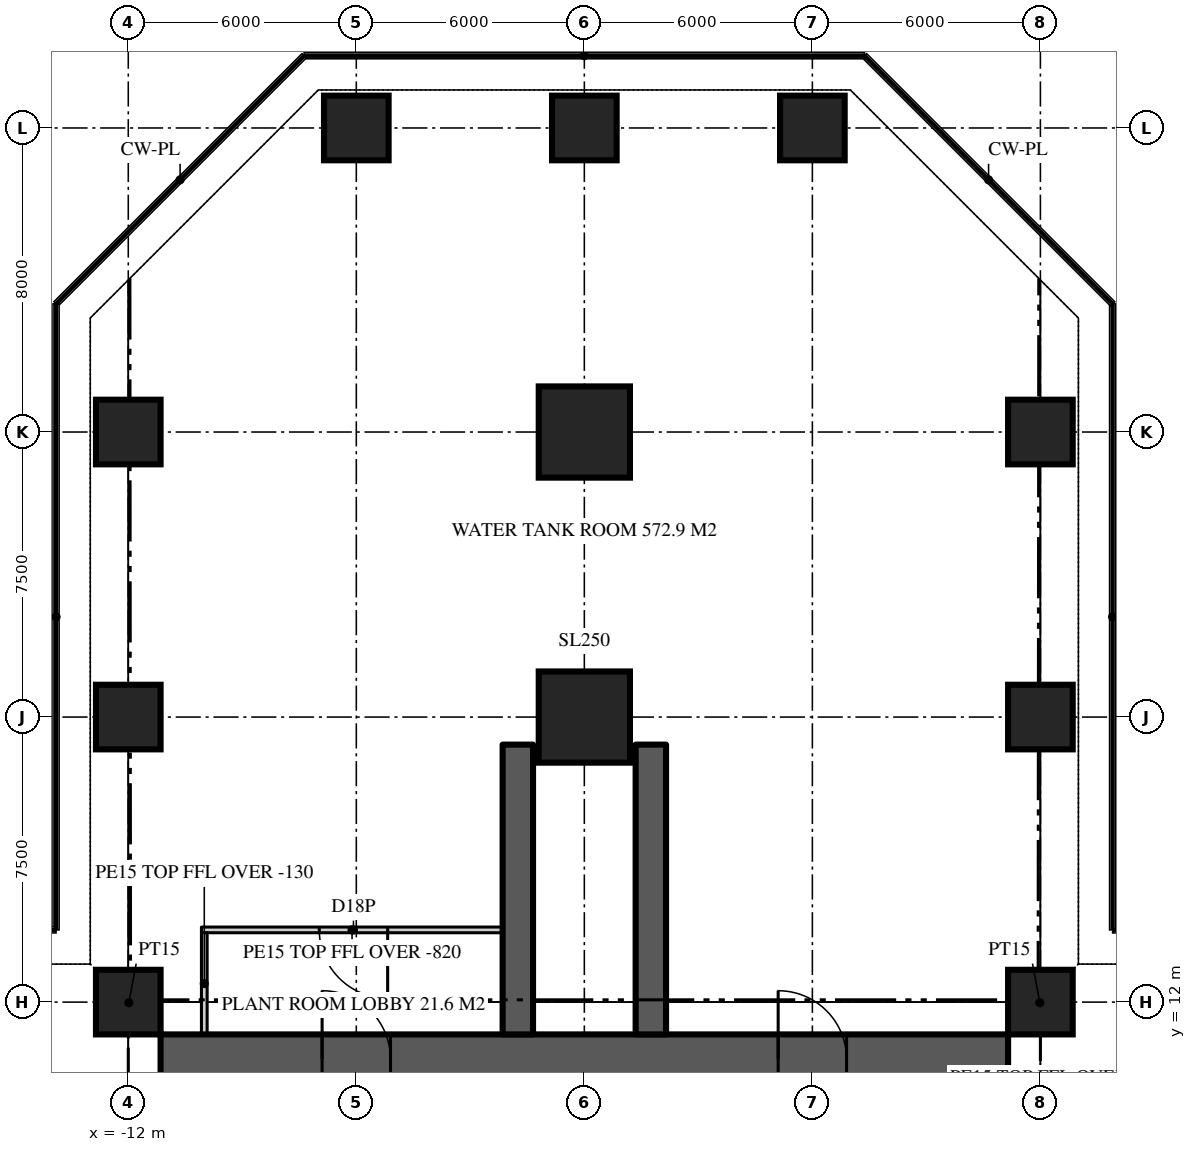
"""IFC4 building model, lengths in metres.
Left out: names, types, materials, properties, quantities, classifications, styles, units other than length and angle.
Written with IfcOpenShell. Run it as: python <this file> out.ifc"""

import sys

from ifc_helpers import new_model, si_unit, direction, frame, frame_2d, origin, origin_2d, place, context, subcontext, project, spatial, rectangle, extrude, element, fill, save


model = new_model("IFC4")
c1 = context("Model", 3, precision=1e-05, world=origin(), true_north=direction((0.0, 1.0)))
c2 = subcontext(c1, "Body", "Model", "MODEL_VIEW")
j1 = project(units=[si_unit("LENGTHUNIT", "METRE"), si_unit("PLANEANGLEUNIT", "RADIAN")], contexts=[c1])
p1 = place(None, origin())
s1 = spatial("IfcSite", under=j1, at=p1, CompositionType="ELEMENT")
p2 = place(p1, origin())
s2 = spatial("IfcBuilding", under=s1, at=p2, CompositionType="ELEMENT")
p3 = place(p2, frame((0.0, 0.0, 37.5)))
s3 = spatial("IfcBuildingStorey", under=s2, at=p3, CompositionType="ELEMENT", Elevation=37.5)
p4 = place(p3, frame((-11.15, 10.5, 0.0), z_axis=(0.0, 0.0, 1.0), x_axis=(1.0, 0.0, 0.0)))
e1 = element("IfcWall", 1, at=p4, inside=s3, PredefinedType="SHEAR", context=c2, shape_type="SweptSolid", body=[
    extrude(rectangle(XDim=22.3, YDim=1.3, at=frame_2d((11.15, 0.0))), origin(), (0.0, 0.0, 1.0), 6.0),
])
p5 = place(p4, frame((4.25, 0.0, 0.0)))
e2 = element("IfcOpeningElement", 2, at=p5, cuts=e1, PredefinedType="OPENING", context=c2, shape_type="SweptSolid", body=[
    extrude(rectangle(XDim=1.8, YDim=2.2, at=frame_2d((0.9, 1.1))), frame((0.0, 0.66, 0.0), z_axis=(0.0, -1.0, 0.0), x_axis=(1.0, 0.0, 0.0)), (0.0, 0.0, 1.0), 1.32),
])
p6 = place(p4, frame((16.25, 0.0, 0.0)))
e3 = element("IfcOpeningElement", 3, at=p6, cuts=e1, PredefinedType="OPENING", context=c2, shape_type="SweptSolid", body=[
    extrude(rectangle(XDim=1.8, YDim=2.2, at=frame_2d((0.9, 1.1))), frame((0.0, 0.66, 0.0), z_axis=(0.0, -1.0, 0.0), x_axis=(1.0, 0.0, 0.0)), (0.0, 0.0, 1.0), 1.32),
])
for number, where, z_axis, x_axis in (
    (4, (1.75, 11.15, 0.0), (0.0, 0.0, 1.0), (0.0, 1.0, 0.0)),
    (5, (-1.75, 11.15, 0.0), (0.0, 0.0, 1.0), (0.0, 1.0, 0.0)),
):
    element("IfcWall", number, at=place(p3, frame(where, z_axis=z_axis, x_axis=x_axis)), inside=s3, PredefinedType="SHEAR", context=c2, shape_type="SweptSolid", body=[
        extrude(rectangle(XDim=7.625, YDim=0.8, at=frame_2d((3.812, 0.0))), origin(), (0.0, 0.0, 1.0), 6.0),
    ])
for number, where, z_axis, x_axis in (
    (6, (-12.0, 12.0, 0.0), (0.0, 0.0, 1.0), (1.0, 0.0, 0.0)),
    (7, (12.0, 12.0, 0.0), (0.0, 0.0, 1.0), (1.0, 0.0, 0.0)),
    (8, (-12.0, 19.5, 0.0), (0.0, 0.0, 1.0), (1.0, 0.0, 0.0)),
):
    element("IfcColumn", number, at=place(p3, frame(where, z_axis=z_axis, x_axis=x_axis)), inside=s3, PredefinedType="COLUMN", context=c2, shape_type="SweptSolid", body=[
        extrude(rectangle(XDim=1.7, YDim=1.7, at=origin_2d()), origin(), (0.0, 0.0, 1.0), 6.0),
    ])
p7 = place(p3, frame((0.0, 19.5, 0.0), z_axis=(0.0, 0.0, 1.0), x_axis=(1.0, 0.0, 0.0)))
e9 = element("IfcColumn", 9, at=p7, inside=s3, PredefinedType="COLUMN", context=c2, shape_type="SweptSolid", body=[
    extrude(rectangle(XDim=2.4, YDim=2.4, at=origin_2d()), origin(), (0.0, 0.0, 1.0), 6.0),
])
for number, where, z_axis, x_axis in (
    (10, (12.0, 19.5, 0.0), (0.0, 0.0, 1.0), (1.0, 0.0, 0.0)),
    (11, (-12.0, 27.0, 0.0), (0.0, 0.0, 1.0), (1.0, 0.0, 0.0)),
):
    element("IfcColumn", number, at=place(p3, frame(where, z_axis=z_axis, x_axis=x_axis)), inside=s3, PredefinedType="COLUMN", context=c2, shape_type="SweptSolid", body=[
        extrude(rectangle(XDim=1.7, YDim=1.7, at=origin_2d()), origin(), (0.0, 0.0, 1.0), 6.0),
    ])
p8 = place(p3, frame((0.0, 27.0, 0.0), z_axis=(0.0, 0.0, 1.0), x_axis=(1.0, 0.0, 0.0)))
e12 = element("IfcColumn", 12, at=p8, inside=s3, PredefinedType="COLUMN", context=c2, shape_type="SweptSolid", body=[
    extrude(rectangle(XDim=2.4, YDim=2.4, at=origin_2d()), origin(), (0.0, 0.0, 1.0), 6.0),
])
for number, where, z_axis, x_axis in (
    (13, (12.0, 27.0, 0.0), (0.0, 0.0, 1.0), (1.0, 0.0, 0.0)),
    (14, (-6.0, 35.0, 0.0), (0.0, 0.0, 1.0), (1.0, 0.0, 0.0)),
    (15, (0.0, 35.0, 0.0), (0.0, 0.0, 1.0), (1.0, 0.0, 0.0)),
    (16, (6.0, 35.0, 0.0), (0.0, 0.0, 1.0), (1.0, 0.0, 0.0)),
):
    element("IfcColumn", number, at=place(p3, frame(where, z_axis=z_axis, x_axis=x_axis)), inside=s3, PredefinedType="COLUMN", context=c2, shape_type="SweptSolid", body=[
        extrude(rectangle(XDim=1.7, YDim=1.7, at=origin_2d()), origin(), (0.0, 0.0, 1.0), 6.0),
    ])
p9 = place(p3, frame((-2.15, 13.9, 0.0), z_axis=(0.0, 0.0, 1.0), x_axis=(-1.0, 0.0, 0.0)))
e17 = element("IfcWall", 17, at=p9, inside=s3, PredefinedType="SOLIDWALL", context=c2, shape_type="SweptSolid", body=[
    extrude(rectangle(XDim=7.925, YDim=0.15, at=frame_2d((3.962, 0.0))), origin(), (0.0, 0.0, 1.0), 5.18),
])
p10 = place(p9, frame((3.025, 0.0, 0.0)))
e18 = element("IfcOpeningElement", 18, at=p10, cuts=e17, PredefinedType="OPENING", context=c2, shape_type="SweptSolid", body=[
    extrude(rectangle(XDim=1.8, YDim=2.4, at=frame_2d((0.9, 1.2))), frame((0.0, 0.085, 0.0), z_axis=(0.0, -1.0, 0.0), x_axis=(1.0, 0.0, 0.0)), (0.0, 0.0, 1.0), 0.17),
])
p11 = place(p3, frame((-10.0, 11.15, 0.0), z_axis=(0.0, 0.0, 1.0), x_axis=(0.0, 1.0, 0.0)))
e19 = element("IfcWall", 19, at=p11, inside=s3, PredefinedType="SOLIDWALL", context=c2, shape_type="SweptSolid", body=[
    extrude(rectangle(XDim=2.675, YDim=0.15, at=frame_2d((1.337, 0.0))), origin(), (0.0, 0.0, 1.0), 5.87),
])
for number, where, z_axis, x_axis in (
    (20, (11.15, 11.15, 0.0), (0.0, 0.0, 1.0), (0.707, 0.707, 0.0)),
    (21, (-11.15, 11.15, 0.0), (0.0, 0.0, 1.0), (-0.707, 0.707, 0.0)),
):
    element("IfcWall", number, at=place(p3, frame(where, z_axis=z_axis, x_axis=x_axis)), inside=s3, PredefinedType="PARTITIONING", context=c2, shape_type="SweptSolid", body=[
        extrude(rectangle(XDim=2.362, YDim=0.15, at=frame_2d((1.181, 0.0))), origin(), (0.0, 0.0, 1.0), 5.32),
    ])
p12 = place(p5, origin())
e22 = element("IfcDoor", 22, at=p12, inside=s3, OperationType="DOUBLE_DOOR_DOUBLE_SWING", PredefinedType="DOOR", context=c2, shape_type="SweptSolid", body=[
    extrude(rectangle(XDim=1.8, YDim=2.2, at=frame_2d((0.9, 1.1))), frame((0.0, 0.025, 0.0), z_axis=(0.0, -1.0, 0.0), x_axis=(1.0, 0.0, 0.0)), (0.0, 0.0, 1.0), 0.05),
])
fill(e2, e22)
p13 = place(p6, origin())
e23 = element("IfcDoor", 23, at=p13, inside=s3, OperationType="DOUBLE_DOOR_DOUBLE_SWING", PredefinedType="DOOR", context=c2, shape_type="SweptSolid", body=[
    extrude(rectangle(XDim=1.8, YDim=2.2, at=frame_2d((0.9, 1.1))), frame((0.0, 0.025, 0.0), z_axis=(0.0, -1.0, 0.0), x_axis=(1.0, 0.0, 0.0)), (0.0, 0.0, 1.0), 0.05),
])
fill(e3, e23)
p14 = place(p10, origin())
e24 = element("IfcDoor", 24, at=p14, inside=s3, OperationType="DOUBLE_DOOR_DOUBLE_SWING", PredefinedType="DOOR", context=c2, shape_type="SweptSolid", body=[
    extrude(rectangle(XDim=1.8, YDim=2.4, at=frame_2d((0.9, 1.2))), frame((0.0, 0.025, 0.0), z_axis=(0.0, -1.0, 0.0), x_axis=(1.0, 0.0, 0.0)), (0.0, 0.0, 1.0), 0.05),
])
fill(e18, e24)
save(model, sys.argv[1])
